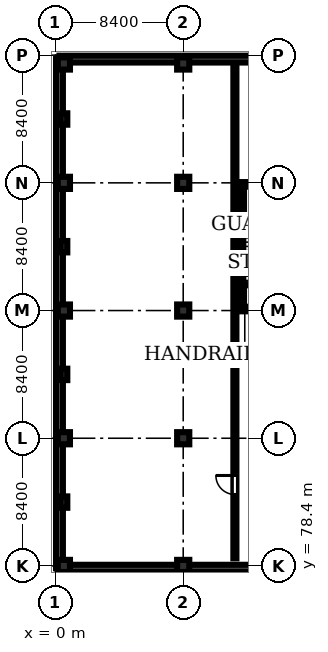
"""IFC4 building model, lengths in metres.
Left out: names, types, materials, properties, quantities, classifications, styles, units other than length and angle.
Written with IfcOpenShell. Run it as: python <this file> out.ifc"""

import sys

from ifc_helpers import new_model, si_unit, direction, frame, frame_2d, origin, origin_2d, place, context, subcontext, project, spatial, rectangle, extrude, element, fill, save


model = new_model("IFC4")
c1 = context("Model", 3, precision=1e-05, world=origin(), true_north=direction((0.0, 1.0)))
c2 = subcontext(c1, "Body", "Model", "MODEL_VIEW")
j1 = project(units=[si_unit("LENGTHUNIT", "METRE"), si_unit("PLANEANGLEUNIT", "RADIAN")], contexts=[c1])
p1 = place(None, origin())
s1 = spatial("IfcSite", under=j1, at=p1, CompositionType="ELEMENT")
p2 = place(p1, origin())
s2 = spatial("IfcBuilding", under=s1, at=p2, CompositionType="ELEMENT")
p3 = place(p2, frame((0.0, 0.0, -9.6)))
s3 = spatial("IfcBuildingStorey", under=s2, at=p3, CompositionType="ELEMENT", Elevation=-9.6)
for number, where, z_axis, x_axis in (
    (1, (0.55, 78.4, 0.0), (0.0, 0.0, 1.0), (1.0, 0.0, 0.0)),
    (2, (0.55, 86.8, 0.0), (0.0, 0.0, 1.0), (1.0, 0.0, 0.0)),
    (3, (0.55, 95.2, 0.0), (0.0, 0.0, 1.0), (1.0, 0.0, 0.0)),
    (4, (0.55, 103.6, 0.0), (0.0, 0.0, 1.0), (1.0, 0.0, 0.0)),
    (5, (0.55, 111.45, 0.0), (0.0, 0.0, 1.0), (1.0, 0.0, 0.0)),
    (6, (8.4, 78.4, 0.0), (0.0, 0.0, 1.0), (1.0, 0.0, 0.0)),
    (7, (8.4, 86.8, 0.0), (0.0, 0.0, 1.0), (1.0, 0.0, 0.0)),
    (8, (8.4, 95.2, 0.0), (0.0, 0.0, 1.0), (1.0, 0.0, 0.0)),
    (9, (8.4, 103.6, 0.0), (0.0, 0.0, 1.0), (1.0, 0.0, 0.0)),
    (10, (8.4, 111.45, 0.0), (0.0, 0.0, 1.0), (1.0, 0.0, 0.0)),
):
    element("IfcColumn", number, at=place(p3, frame(where, z_axis=z_axis, x_axis=x_axis)), inside=s3, PredefinedType="COLUMN", context=c2, shape_type="SweptSolid", body=[
        extrude(rectangle(XDim=0.8, YDim=0.8, at=origin_2d()), origin(), (0.0, 0.0, 1.0), 4.48),
    ])
for number, where, z_axis, x_axis in (
    (11, (0.55, 82.6, 0.0), (0.0, 0.0, 1.0), (1.0, 0.0, 0.0)),
    (12, (0.55, 91.0, 0.0), (0.0, 0.0, 1.0), (1.0, 0.0, 0.0)),
    (13, (0.55, 99.4, 0.0), (0.0, 0.0, 1.0), (1.0, 0.0, 0.0)),
    (14, (0.55, 107.8, 0.0), (0.0, 0.0, 1.0), (1.0, 0.0, 0.0)),
):
    element("IfcColumn", number, at=place(p3, frame(where, z_axis=z_axis, x_axis=x_axis)), inside=s3, PredefinedType="PILASTER", context=c2, shape_type="SweptSolid", body=[
        extrude(rectangle(XDim=0.45, YDim=0.75, at=origin_2d()), origin(), (0.0, 0.0, 1.0), 4.48),
    ])
p4 = place(p3, frame((0.26, 78.25, 0.0), z_axis=(0.0, 0.0, 1.0), x_axis=(1.0, 0.0, 0.0)))
e15 = element("IfcWall", 15, at=p4, inside=s3, PredefinedType="SHEAR", context=c2, shape_type="SweptSolid", body=[
    extrude(rectangle(XDim=138.39, YDim=0.45, at=frame_2d((69.195, 0.0))), origin(), (0.0, 0.0, 1.0), 3.7),
])
p5 = place(p3, frame((163.74, 111.74, 0.0), z_axis=(0.0, 0.0, 1.0), x_axis=(-1.0, 0.0, 0.0)))
e16 = element("IfcWall", 16, at=p5, inside=s3, PredefinedType="SHEAR", context=c2, shape_type="SweptSolid", body=[
    extrude(rectangle(XDim=163.48, YDim=0.45, at=frame_2d((81.74, 0.0))), origin(), (0.0, 0.0, 1.0), 3.7),
])
p6 = place(p3, frame((0.26, 111.74, 0.0), z_axis=(0.0, 0.0, 1.0), x_axis=(0.0, -1.0, 0.0)))
e17 = element("IfcWall", 17, at=p6, inside=s3, PredefinedType="SHEAR", context=c2, shape_type="SweptSolid", body=[
    extrude(rectangle(XDim=33.49, YDim=0.45, at=frame_2d((16.745, 0.0))), origin(), (0.0, 0.0, 1.0), 3.7),
])
p7 = place(p3, frame((12.1, 95.3, 0.0), z_axis=(0.0, 0.0, 1.0), x_axis=(1.0, 0.0, 0.0)))
e18 = element("IfcWall", 18, at=p7, inside=s3, PredefinedType="SHEAR", context=c2, shape_type="SweptSolid", body=[
    extrude(rectangle(XDim=3.7, YDim=0.3, at=frame_2d((1.85, 0.0))), origin(), (0.0, 0.0, 1.0), 4.48),
])
p8 = place(p7, frame((0.95, 0.0, 0.0)))
e19 = element("IfcOpeningElement", 19, at=p8, cuts=e18, PredefinedType="OPENING", context=c2, shape_type="SweptSolid", body=[
    extrude(rectangle(XDim=1.15, YDim=2.15, at=frame_2d((0.575, 1.075))), frame((0.0, 0.16, 0.0), z_axis=(0.0, -1.0, 0.0), x_axis=(1.0, 0.0, 0.0)), (0.0, 0.0, 1.0), 0.32),
])
p9 = place(p3, frame((12.1, 103.5, 0.0), z_axis=(0.0, 0.0, 1.0), x_axis=(1.0, 0.0, 0.0)))
e20 = element("IfcWall", 20, at=p9, inside=s3, PredefinedType="SHEAR", context=c2, shape_type="SweptSolid", body=[
    extrude(rectangle(XDim=3.7, YDim=0.3, at=frame_2d((1.85, 0.0))), origin(), (0.0, 0.0, 1.0), 4.48),
])
p10 = place(p3, frame((12.25, 95.45, 0.0), z_axis=(0.0, 0.0, 1.0), x_axis=(0.0, 1.0, 0.0)))
e21 = element("IfcWall", 21, at=p10, inside=s3, PredefinedType="SHEAR", context=c2, shape_type="SweptSolid", body=[
    extrude(rectangle(XDim=7.9, YDim=0.3, at=frame_2d((3.95, 0.0))), origin(), (0.0, 0.0, 1.0), 4.48),
])
p11 = place(p3, frame((11.8, 78.9, 0.0), z_axis=(0.0, 0.0, 1.0), x_axis=(0.0, 1.0, 0.0)))
e22 = element("IfcWall", 22, at=p11, inside=s3, PredefinedType="SOLIDWALL", context=c2, shape_type="SweptSolid", body=[
    extrude(rectangle(XDim=32.3, YDim=0.2, at=frame_2d((16.15, 0.0))), origin(), (0.0, 0.0, 1.0), 4.48),
])
p12 = place(p11, frame((4.2, 0.0, 0.0)))
e23 = element("IfcOpeningElement", 23, at=p12, cuts=e22, PredefinedType="OPENING", context=c2, shape_type="SweptSolid", body=[
    extrude(rectangle(XDim=1.25, YDim=2.2, at=frame_2d((0.625, 1.1))), frame((0.0, 0.11, 0.0), z_axis=(0.0, -1.0, 0.0), x_axis=(1.0, 0.0, 0.0)), (0.0, 0.0, 1.0), 0.22),
])
p13 = place(p12, origin())
e24 = element("IfcDoor", 24, at=p13, inside=s3, OperationType="SINGLE_SWING_RIGHT", PredefinedType="DOOR", context=c2, shape_type="SweptSolid", body=[
    extrude(rectangle(XDim=1.25, YDim=2.2, at=frame_2d((0.625, 1.1))), frame((0.0, 0.025, 0.0), z_axis=(0.0, -1.0, 0.0), x_axis=(1.0, 0.0, 0.0)), (0.0, 0.0, 1.0), 0.05),
])
fill(e23, e24)
save(model, sys.argv[1])
